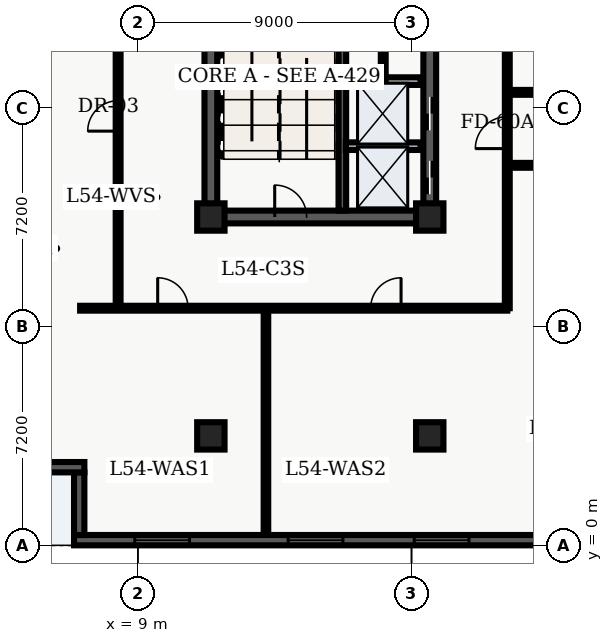
"""IFC4 building model, lengths in metres.
Left out: names, types, materials, properties, quantities, classifications, styles, units other than length and angle.
Written with IfcOpenShell. Run it as: python <this file> out.ifc"""

import sys

from ifc_helpers import new_model, entity, si_unit, converted_unit, direction, frame, origin_with_axes, origin_2d_with_axis, place, context, subcontext, project, spatial, polyline, rectangle, outline, extrude, element, fill, save


model = new_model("IFC4")
c1 = context("Model", 3, precision=1e-05, world=origin_with_axes(), true_north=direction((0.0, 1.0)))
c2 = subcontext(c1, "Body", "Model", "MODEL_VIEW")
j1 = project(units=[si_unit("LENGTHUNIT", "METRE"), converted_unit("PLANEANGLEUNIT", "DEGREE", entity("IfcPlaneAngleMeasure", 0.017), si_unit("PLANEANGLEUNIT", "RADIAN"), dimensions=[0, 0, 0, 0, 0, 0, 0])], contexts=[c1])
p1 = place(None, origin_with_axes())
s1 = spatial("IfcSite", under=j1, at=p1, CompositionType="ELEMENT")
p2 = place(p1, origin_with_axes())
s2 = spatial("IfcBuilding", under=s1, at=p2, CompositionType="ELEMENT")
p3 = place(p2, frame((0.0, 0.0, 219.9), z_axis=(0.0, 0.0, 1.0), x_axis=(1.0, 0.0, 0.0)))
s3 = spatial("IfcBuildingStorey", under=s2, at=p3, CompositionType="ELEMENT", Elevation=219.9)
p4 = place(p3, frame((11.4, 10.8, 0.0), z_axis=(0.0, 0.0, 1.0), x_axis=(0.0, 1.0, 0.0)))
e1 = element("IfcWall", 1, at=p4, inside=s3, PredefinedType="SHEAR", context=c2, shape_type="SweptSolid", body=[
    extrude(outline(polyline([(0.0, -0.21), (27.0, -0.21), (27.0, 0.21), (0.0, 0.21), (0.0, -0.21)])), origin_with_axes(), (0.0, 0.0, 1.0), 4.56),
])
p5 = place(p3, frame((11.4, 10.8, 0.0), z_axis=(0.0, 0.0, 1.0), x_axis=(1.0, 0.0, 0.0)))
e2 = element("IfcWall", 2, at=p5, inside=s3, PredefinedType="SHEAR", context=c2, shape_type="SweptSolid", body=[
    extrude(outline(polyline([(0.0, -0.21), (7.2, -0.21), (7.2, 0.21), (0.0, 0.21), (0.0, -0.21)])), origin_with_axes(), (0.0, 0.0, 1.0), 4.56),
])
p6 = place(p5, frame((2.625, 0.0, 0.0), z_axis=(0.0, 0.0, 1.0), x_axis=(1.0, 0.0, 0.0)))
e3 = element("IfcOpeningElement", 3, at=p6, cuts=e2, PredefinedType="OPENING", context=c2, shape_type="SweptSolid", body=[
    extrude(rectangle(XDim=1.05, YDim=0.44, at=origin_2d_with_axis()), origin_with_axes(), (0.0, 0.0, 1.0), 2.15),
])
p7 = place(p3, frame((18.6, 10.8, 0.0), z_axis=(0.0, 0.0, 1.0), x_axis=(0.0, 1.0, 0.0)))
e4 = element("IfcWall", 4, at=p7, inside=s3, PredefinedType="SHEAR", context=c2, shape_type="SweptSolid", body=[
    extrude(outline(polyline([(0.0, -0.21), (13.5, -0.21), (13.5, 0.21), (0.0, 0.21), (0.0, -0.21)])), origin_with_axes(), (0.0, 0.0, 1.0), 4.56),
])
p8 = place(p7, frame((1.3, 0.0, 0.0), z_axis=(0.0, 0.0, 1.0), x_axis=(1.0, 0.0, 0.0)))
e5 = element("IfcOpeningElement", 5, at=p8, cuts=e4, PredefinedType="OPENING", context=c2, shape_type="SweptSolid", body=[
    extrude(rectangle(XDim=1.1, YDim=0.44, at=origin_2d_with_axis()), origin_with_axes(), (0.0, 0.0, 1.0), 2.15),
])
p9 = place(p7, frame((3.4, 0.0, 0.0), z_axis=(0.0, 0.0, 1.0), x_axis=(1.0, 0.0, 0.0)))
e6 = element("IfcOpeningElement", 6, at=p9, cuts=e4, PredefinedType="OPENING", context=c2, shape_type="SweptSolid", body=[
    extrude(rectangle(XDim=1.1, YDim=0.44, at=origin_2d_with_axis()), origin_with_axes(), (0.0, 0.0, 1.0), 2.15),
])
p10 = place(p7, frame((11.125, 0.0, 0.0), z_axis=(0.0, 0.0, 1.0), x_axis=(1.0, 0.0, 0.0)))
e7 = element("IfcOpeningElement", 7, at=p10, cuts=e4, PredefinedType="OPENING", context=c2, shape_type="SweptSolid", body=[
    extrude(rectangle(XDim=1.05, YDim=0.44, at=origin_2d_with_axis()), origin_with_axes(), (0.0, 0.0, 1.0), 2.15),
])
p11 = place(p7, frame((6.675, 0.0, 0.0), z_axis=(0.0, 0.0, 1.0), x_axis=(1.0, 0.0, 0.0)))
e8 = element("IfcOpeningElement", 8, at=p11, cuts=e4, PredefinedType="OPENING", context=c2, shape_type="SweptSolid", body=[
    extrude(rectangle(XDim=0.95, YDim=0.44, at=origin_2d_with_axis()), origin_with_axes(), (0.0, 0.0, 1.0), 2.15),
])
p12 = place(p3, frame((15.725, 11.01, 0.0), z_axis=(0.0, 0.0, 1.0), x_axis=(0.0, 1.0, 0.0)))
e9 = element("IfcWall", 9, at=p12, inside=s3, PredefinedType="SHEAR", context=c2, shape_type="SweptSolid", body=[
    extrude(outline(polyline([(0.0, -0.125), (8.69, -0.125), (8.69, 0.125), (0.0, 0.125), (0.0, -0.125)])), origin_with_axes(), (0.0, 0.0, 1.0), 4.56),
])
for number, where, z_axis, x_axis in (
    (10, (11.4, 3.6, 0.0), (0.0, 0.0, 1.0), (1.0, 0.0, 0.0)),
    (11, (11.4, 10.8, 0.0), (0.0, 0.0, 1.0), (1.0, 0.0, 0.0)),
    (12, (18.6, 3.6, 0.0), (0.0, 0.0, 1.0), (1.0, 0.0, 0.0)),
    (13, (18.6, 10.8, 0.0), (0.0, 0.0, 1.0), (1.0, 0.0, 0.0)),
):
    element("IfcColumn", number, at=place(p3, frame(where, z_axis=z_axis, x_axis=x_axis)), inside=s3, PredefinedType="COLUMN", context=c2, shape_type="SweptSolid", body=[
        extrude(rectangle(XDim=0.9, YDim=0.9, at=origin_2d_with_axis()), origin_with_axes(), (0.0, 0.0, 1.0), 4.8),
    ])
for number, where, z_axis, x_axis in (
    (14, (15.84, 13.13, 0.0), (0.0, 0.0, 1.0), (1.0, 0.0, 0.0)),
    (15, (15.84, 15.27, 0.0), (0.0, 0.0, 1.0), (1.0, 0.0, 0.0)),
):
    element("IfcWall", number, at=place(p3, frame(where, z_axis=z_axis, x_axis=x_axis)), inside=s3, PredefinedType="SOLIDWALL", context=c2, shape_type="SweptSolid", body=[
        extrude(outline(polyline([(0.0, -0.125), (2.46, -0.125), (2.46, 0.125), (0.0, 0.125), (0.0, -0.125)])), origin_with_axes(), (0.0, 0.0, 1.0), 3.2),
    ])
p13 = place(p3, frame((17.07, 15.34, 0.0), z_axis=(0.0, 0.0, 1.0), x_axis=(0.0, 1.0, 0.0)))
e16 = element("IfcWall", 16, at=p13, inside=s3, PredefinedType="PARTITIONING", context=c2, shape_type="SweptSolid", body=[
    extrude(outline(polyline([(0.0, -0.08), (4.36, -0.08), (4.36, 0.08), (0.0, 0.08), (0.0, -0.08)])), origin_with_axes(), (0.0, 0.0, 1.0), 3.2),
])
p14 = place(p13, frame((2.05, 0.0, 0.0), z_axis=(0.0, 0.0, 1.0), x_axis=(1.0, 0.0, 0.0)))
e17 = element("IfcOpeningElement", 17, at=p14, cuts=e16, PredefinedType="OPENING", context=c2, shape_type="SweptSolid", body=[
    extrude(rectangle(XDim=0.9, YDim=0.18, at=origin_2d_with_axis()), origin_with_axes(), (0.0, 0.0, 1.0), 2.15),
])
p15 = place(p3, frame((7.1, 7.8, 0.0), z_axis=(0.0, 0.0, 1.0), x_axis=(1.0, 0.0, 0.0)))
e18 = element("IfcWall", 18, at=p15, inside=s3, PredefinedType="PARTITIONING", context=c2, shape_type="SweptSolid", body=[
    extrude(outline(polyline([(0.0, -0.08), (14.05, -0.08), (14.05, 0.08), (0.0, 0.08), (0.0, -0.08)])), origin_with_axes(), (0.0, 0.0, 1.0), 3.2),
])
p16 = place(p15, frame((3.051, 0.0, 0.0), z_axis=(0.0, 0.0, 1.0), x_axis=(1.0, 0.0, 0.0)))
e19 = element("IfcOpeningElement", 19, at=p16, cuts=e18, PredefinedType="OPENING", context=c2, shape_type="SweptSolid", body=[
    extrude(rectangle(XDim=1.0, YDim=0.18, at=origin_2d_with_axis()), origin_with_axes(), (0.0, 0.0, 1.0), 2.15),
])
p17 = place(p15, frame((10.056, 0.0, 0.0), z_axis=(0.0, 0.0, 1.0), x_axis=(1.0, 0.0, 0.0)))
e20 = element("IfcOpeningElement", 20, at=p17, cuts=e18, PredefinedType="OPENING", context=c2, shape_type="SweptSolid", body=[
    extrude(rectangle(XDim=1.0, YDim=0.18, at=origin_2d_with_axis()), origin_with_axes(), (0.0, 0.0, 1.0), 2.15),
])
p18 = place(p3, frame((21.15, 7.8, 0.0), z_axis=(0.0, 0.0, 1.0), x_axis=(0.0, 1.0, 0.0)))
e21 = element("IfcWall", 21, at=p18, inside=s3, PredefinedType="PARTITIONING", context=c2, shape_type="SweptSolid", body=[
    extrude(outline(polyline([(0.0, -0.08), (32.7, -0.08), (32.7, 0.08), (0.0, 0.08), (0.0, -0.08)])), origin_with_axes(), (0.0, 0.0, 1.0), 3.2),
])
p19 = place(p18, frame((18.032, 0.0, 0.0), z_axis=(0.0, 0.0, 1.0), x_axis=(1.0, 0.0, 0.0)))
e22 = element("IfcOpeningElement", 22, at=p19, cuts=e21, PredefinedType="OPENING", context=c2, shape_type="SweptSolid", body=[
    extrude(rectangle(XDim=1.0, YDim=0.18, at=origin_2d_with_axis()), origin_with_axes(), (0.0, 0.0, 1.0), 2.15),
])
p20 = place(p18, frame((27.352, 0.0, 0.0), z_axis=(0.0, 0.0, 1.0), x_axis=(1.0, 0.0, 0.0)))
e23 = element("IfcOpeningElement", 23, at=p20, cuts=e21, PredefinedType="OPENING", context=c2, shape_type="SweptSolid", body=[
    extrude(rectangle(XDim=1.0, YDim=0.18, at=origin_2d_with_axis()), origin_with_axes(), (0.0, 0.0, 1.0), 2.15),
])
p21 = place(p18, frame((5.775, 0.0, 0.0), z_axis=(0.0, 0.0, 1.0), x_axis=(1.0, 0.0, 0.0)))
e24 = element("IfcOpeningElement", 24, at=p21, cuts=e21, PredefinedType="OPENING", context=c2, shape_type="SweptSolid", body=[
    extrude(rectangle(XDim=1.05, YDim=0.18, at=origin_2d_with_axis()), origin_with_axes(), (0.0, 0.0, 1.0), 2.15),
])
p22 = place(p3, frame((8.35, 7.8, 0.0), z_axis=(0.0, 0.0, 1.0), x_axis=(0.0, 1.0, 0.0)))
e25 = element("IfcWall", 25, at=p22, inside=s3, PredefinedType="PARTITIONING", context=c2, shape_type="SweptSolid", body=[
    extrude(outline(polyline([(0.0, -0.08), (12.6, -0.08), (12.6, 0.08), (0.0, 0.08), (0.0, -0.08)])), origin_with_axes(), (0.0, 0.0, 1.0), 3.2),
])
p23 = place(p22, frame((6.325, 0.0, 0.0), z_axis=(0.0, 0.0, 1.0), x_axis=(1.0, 0.0, 0.0)))
e26 = element("IfcOpeningElement", 26, at=p23, cuts=e25, PredefinedType="OPENING", context=c2, shape_type="SweptSolid", body=[
    extrude(rectangle(XDim=1.0, YDim=0.18, at=origin_2d_with_axis()), origin_with_axes(), (0.0, 0.0, 1.0), 2.15),
])
p24 = place(p3, frame((13.212, 0.335, 0.0), z_axis=(0.0, 0.0, 1.0), x_axis=(0.0, 1.0, 0.0)))
e27 = element("IfcWall", 27, at=p24, inside=s3, PredefinedType="PARTITIONING", context=c2, shape_type="SweptSolid", body=[
    extrude(outline(polyline([(0.0, -0.075), (7.365, -0.075), (7.365, 0.075), (0.0, 0.075), (0.0, -0.075)])), origin_with_axes(), (0.0, 0.0, 1.0), 3.2),
])
p25 = place(p3, frame((21.15, 12.5, 0.0), z_axis=(0.0, 0.0, 1.0), x_axis=(1.0, 0.0, 0.0)))
e28 = element("IfcWall", 28, at=p25, inside=s3, PredefinedType="PARTITIONING", context=c2, shape_type="SweptSolid", body=[
    extrude(outline(polyline([(0.0, -0.08), (15.2, -0.08), (15.2, 0.08), (0.0, 0.08), (0.0, -0.08)])), origin_with_axes(), (0.0, 0.0, 1.0), 3.2),
])
p26 = place(p25, frame((7.65, 0.0, 0.0), z_axis=(0.0, 0.0, 1.0), x_axis=(1.0, 0.0, 0.0)))
e29 = element("IfcOpeningElement", 29, at=p26, cuts=e28, PredefinedType="OPENING", context=c2, shape_type="SweptSolid", body=[
    extrude(rectangle(XDim=1.0, YDim=0.18, at=origin_2d_with_axis()), origin_with_axes(), (0.0, 0.0, 1.0), 2.15),
])
p27 = place(p3, frame((21.15, 14.9, 0.0), z_axis=(0.0, 0.0, 1.0), x_axis=(1.0, 0.0, 0.0)))
e30 = element("IfcWall", 30, at=p27, inside=s3, PredefinedType="PARTITIONING", context=c2, shape_type="SweptSolid", body=[
    extrude(outline(polyline([(0.0, -0.08), (15.2, -0.08), (15.2, 0.08), (0.0, 0.08), (0.0, -0.08)])), origin_with_axes(), (0.0, 0.0, 1.0), 3.2),
])
p28 = place(p27, frame((3.583, 0.0, 0.0), z_axis=(0.0, 0.0, 1.0), x_axis=(1.0, 0.0, 0.0)))
e31 = element("IfcOpeningElement", 31, at=p28, cuts=e30, PredefinedType="OPENING", context=c2, shape_type="SweptSolid", body=[
    extrude(rectangle(XDim=1.0, YDim=0.18, at=origin_2d_with_axis()), origin_with_axes(), (0.0, 0.0, 1.0), 2.15),
])
p29 = place(p27, frame((11.053, 0.0, 0.0), z_axis=(0.0, 0.0, 1.0), x_axis=(1.0, 0.0, 0.0)))
e32 = element("IfcOpeningElement", 32, at=p29, cuts=e30, PredefinedType="OPENING", context=c2, shape_type="SweptSolid", body=[
    extrude(rectangle(XDim=1.0, YDim=0.18, at=origin_2d_with_axis()), origin_with_axes(), (0.0, 0.0, 1.0), 2.15),
])
p30 = place(p3, frame((49.46, 0.17, 0.0), z_axis=(0.0, 0.0, 1.0), x_axis=(-1.0, 0.0, 0.0)))
e33 = element("IfcWall", 33, at=p30, inside=s3, PredefinedType="SOLIDWALL", context=c2, shape_type="SweptSolid", body=[
    extrude(outline(polyline([(0.0, -0.17), (42.56, -0.17), (42.56, 0.17), (0.0, 0.17), (0.0, -0.17)])), origin_with_axes(), (0.0, 0.0, 1.0), 4.56),
])
p31 = place(p30, frame((2.898, 0.0, 0.45), z_axis=(0.0, 0.0, 1.0), x_axis=(1.0, 0.0, 0.0)))
e34 = element("IfcOpeningElement", 34, at=p31, cuts=e33, PredefinedType="OPENING", context=c2, shape_type="SweptSolid", body=[
    extrude(rectangle(XDim=1.8, YDim=0.36, at=origin_2d_with_axis()), origin_with_axes(), (0.0, 0.0, 1.0), 2.1),
])
p32 = place(p30, frame((7.493, 0.0, 0.45), z_axis=(0.0, 0.0, 1.0), x_axis=(1.0, 0.0, 0.0)))
e35 = element("IfcOpeningElement", 35, at=p32, cuts=e33, PredefinedType="OPENING", context=c2, shape_type="SweptSolid", body=[
    extrude(rectangle(XDim=1.8, YDim=0.36, at=origin_2d_with_axis()), origin_with_axes(), (0.0, 0.0, 1.0), 2.1),
])
p33 = place(p30, frame((12.089, 0.0, 0.45), z_axis=(0.0, 0.0, 1.0), x_axis=(1.0, 0.0, 0.0)))
e36 = element("IfcOpeningElement", 36, at=p33, cuts=e33, PredefinedType="OPENING", context=c2, shape_type="SweptSolid", body=[
    extrude(rectangle(XDim=1.8, YDim=0.36, at=origin_2d_with_axis()), origin_with_axes(), (0.0, 0.0, 1.0), 2.1),
])
p34 = place(p30, frame((16.684, 0.0, 0.45), z_axis=(0.0, 0.0, 1.0), x_axis=(1.0, 0.0, 0.0)))
e37 = element("IfcOpeningElement", 37, at=p34, cuts=e33, PredefinedType="OPENING", context=c2, shape_type="SweptSolid", body=[
    extrude(rectangle(XDim=1.8, YDim=0.36, at=origin_2d_with_axis()), origin_with_axes(), (0.0, 0.0, 1.0), 2.1),
])
p35 = place(p30, frame((21.28, 0.0, 0.45), z_axis=(0.0, 0.0, 1.0), x_axis=(1.0, 0.0, 0.0)))
e38 = element("IfcOpeningElement", 38, at=p35, cuts=e33, PredefinedType="OPENING", context=c2, shape_type="SweptSolid", body=[
    extrude(rectangle(XDim=1.8, YDim=0.36, at=origin_2d_with_axis()), origin_with_axes(), (0.0, 0.0, 1.0), 2.1),
])
p36 = place(p30, frame((25.876, 0.0, 0.45), z_axis=(0.0, 0.0, 1.0), x_axis=(1.0, 0.0, 0.0)))
e39 = element("IfcOpeningElement", 39, at=p36, cuts=e33, PredefinedType="OPENING", context=c2, shape_type="SweptSolid", body=[
    extrude(rectangle(XDim=1.8, YDim=0.36, at=origin_2d_with_axis()), origin_with_axes(), (0.0, 0.0, 1.0), 2.1),
])
p37 = place(p30, frame((30.471, 0.0, 0.45), z_axis=(0.0, 0.0, 1.0), x_axis=(1.0, 0.0, 0.0)))
e40 = element("IfcOpeningElement", 40, at=p37, cuts=e33, PredefinedType="OPENING", context=c2, shape_type="SweptSolid", body=[
    extrude(rectangle(XDim=1.8, YDim=0.36, at=origin_2d_with_axis()), origin_with_axes(), (0.0, 0.0, 1.0), 2.1),
])
p38 = place(p30, frame((34.617, 0.0, 0.45), z_axis=(0.0, 0.0, 1.0), x_axis=(1.0, 0.0, 0.0)))
e41 = element("IfcOpeningElement", 41, at=p38, cuts=e33, PredefinedType="OPENING", context=c2, shape_type="SweptSolid", body=[
    extrude(rectangle(XDim=1.8, YDim=0.36, at=origin_2d_with_axis()), origin_with_axes(), (0.0, 0.0, 1.0), 2.1),
])
p39 = place(p30, frame((39.662, 0.0, 0.45), z_axis=(0.0, 0.0, 1.0), x_axis=(1.0, 0.0, 0.0)))
e42 = element("IfcOpeningElement", 42, at=p39, cuts=e33, PredefinedType="OPENING", context=c2, shape_type="SweptSolid", body=[
    extrude(rectangle(XDim=1.8, YDim=0.36, at=origin_2d_with_axis()), origin_with_axes(), (0.0, 0.0, 1.0), 2.1),
])
p40 = place(p3, frame((7.07, 0.34, 0.0), z_axis=(0.0, 0.0, 1.0), x_axis=(0.0, 1.0, 0.0)))
e43 = element("IfcWall", 43, at=p40, inside=s3, PredefinedType="SOLIDWALL", context=c2, shape_type="SweptSolid", body=[
    extrude(outline(polyline([(0.0, -0.17), (2.06, -0.17), (2.06, 0.17), (0.0, 0.17), (0.0, -0.17)])), origin_with_axes(), (0.0, 0.0, 1.0), 4.56),
])
p41 = place(p3, frame((7.24, 2.57, 0.0), z_axis=(0.0, 0.0, 1.0), x_axis=(-1.0, 0.0, 0.0)))
e44 = element("IfcWall", 44, at=p41, inside=s3, PredefinedType="SOLIDWALL", context=c2, shape_type="SweptSolid", body=[
    extrude(outline(polyline([(0.0, -0.17), (2.74, -0.17), (2.74, 0.17), (0.0, 0.17), (0.0, -0.17)])), origin_with_axes(), (0.0, 0.0, 1.0), 4.56),
])
p42 = place(p7, frame((1.3, 0.0, 0.0), z_axis=(0.0, 0.0, 1.0), x_axis=(1.0, 0.0, 0.0)))
e45 = element("IfcDoor", 45, at=p42, inside=s3, OperationType="SLIDING_TO_LEFT", PredefinedType="DOOR", context=c2, shape_type="SweptSolid", body=[
    extrude(rectangle(XDim=1.1, YDim=0.09, at=origin_2d_with_axis()), origin_with_axes(), (0.0, 0.0, 1.0), 2.15),
])
fill(e5, e45)
p43 = place(p7, frame((3.4, 0.0, 0.0), z_axis=(0.0, 0.0, 1.0), x_axis=(1.0, 0.0, 0.0)))
e46 = element("IfcDoor", 46, at=p43, inside=s3, OperationType="SLIDING_TO_RIGHT", PredefinedType="DOOR", context=c2, shape_type="SweptSolid", body=[
    extrude(rectangle(XDim=1.1, YDim=0.09, at=origin_2d_with_axis()), origin_with_axes(), (0.0, 0.0, 1.0), 2.15),
])
fill(e6, e46)
p44 = place(p5, frame((2.625, 0.0, 0.0), z_axis=(0.0, 0.0, 1.0), x_axis=(1.0, 0.0, 0.0)))
e47 = element("IfcDoor", 47, at=p44, inside=s3, OperationType="SINGLE_SWING_LEFT", PredefinedType="DOOR", context=c2, shape_type="SweptSolid", body=[
    extrude(rectangle(XDim=1.05, YDim=0.09, at=origin_2d_with_axis()), origin_with_axes(), (0.0, 0.0, 1.0), 2.15),
])
fill(e3, e47)
p45 = place(p22, frame((6.325, 0.0, 0.0), z_axis=(0.0, 0.0, 1.0), x_axis=(1.0, 0.0, 0.0)))
e48 = element("IfcDoor", 48, at=p45, inside=s3, OperationType="SINGLE_SWING_LEFT", PredefinedType="DOOR", context=c2, shape_type="SweptSolid", body=[
    extrude(rectangle(XDim=1.0, YDim=0.09, at=origin_2d_with_axis()), origin_with_axes(), (0.0, 0.0, 1.0), 2.15),
])
fill(e26, e48)
p46 = place(p15, frame((3.051, 0.0, 0.0), z_axis=(0.0, 0.0, 1.0), x_axis=(1.0, 0.0, 0.0)))
e49 = element("IfcDoor", 49, at=p46, inside=s3, OperationType="SINGLE_SWING_LEFT", PredefinedType="DOOR", context=c2, shape_type="SweptSolid", body=[
    extrude(rectangle(XDim=1.0, YDim=0.09, at=origin_2d_with_axis()), origin_with_axes(), (0.0, 0.0, 1.0), 2.15),
])
fill(e19, e49)
p47 = place(p15, frame((10.056, 0.0, 0.0), z_axis=(0.0, 0.0, 1.0), x_axis=(1.0, 0.0, 0.0)))
e50 = element("IfcDoor", 50, at=p47, inside=s3, OperationType="SINGLE_SWING_RIGHT", PredefinedType="DOOR", context=c2, shape_type="SweptSolid", body=[
    extrude(rectangle(XDim=1.0, YDim=0.09, at=origin_2d_with_axis()), origin_with_axes(), (0.0, 0.0, 1.0), 2.15),
])
fill(e20, e50)
p48 = place(p18, frame((5.775, 0.0, 0.0), z_axis=(0.0, 0.0, 1.0), x_axis=(1.0, 0.0, 0.0)))
e51 = element("IfcDoor", 51, at=p48, inside=s3, OperationType="SINGLE_SWING_LEFT", PredefinedType="DOOR", context=c2, shape_type="SweptSolid", body=[
    extrude(rectangle(XDim=1.05, YDim=0.09, at=origin_2d_with_axis()), origin_with_axes(), (0.0, 0.0, 1.0), 2.15),
])
fill(e24, e51)
p49 = place(p30, frame((30.471, 0.0, 0.45), z_axis=(0.0, 0.0, 1.0), x_axis=(1.0, 0.0, 0.0)))
e52 = element("IfcWindow", 52, at=p49, inside=s3, PredefinedType="WINDOW", context=c2, shape_type="SweptSolid", body=[
    extrude(rectangle(XDim=1.8, YDim=0.09, at=origin_2d_with_axis()), origin_with_axes(), (0.0, 0.0, 1.0), 2.1),
])
fill(e40, e52)
p50 = place(p30, frame((34.617, 0.0, 0.45), z_axis=(0.0, 0.0, 1.0), x_axis=(1.0, 0.0, 0.0)))
e53 = element("IfcWindow", 53, at=p50, inside=s3, PredefinedType="WINDOW", context=c2, shape_type="SweptSolid", body=[
    extrude(rectangle(XDim=1.8, YDim=0.09, at=origin_2d_with_axis()), origin_with_axes(), (0.0, 0.0, 1.0), 2.1),
])
fill(e41, e53)
p51 = place(p30, frame((39.662, 0.0, 0.45), z_axis=(0.0, 0.0, 1.0), x_axis=(1.0, 0.0, 0.0)))
e54 = element("IfcWindow", 54, at=p51, inside=s3, PredefinedType="WINDOW", context=c2, shape_type="SweptSolid", body=[
    extrude(rectangle(XDim=1.8, YDim=0.09, at=origin_2d_with_axis()), origin_with_axes(), (0.0, 0.0, 1.0), 2.1),
])
fill(e42, e54)
save(model, sys.argv[1])
